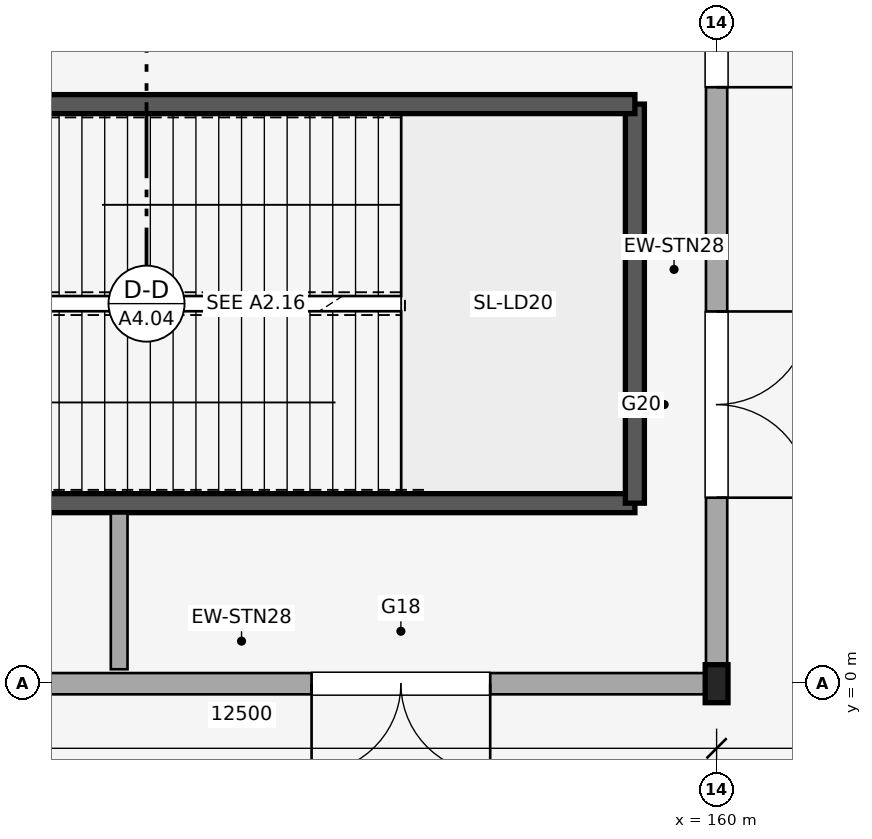
"""IFC4 building model, lengths in metres.
Left out: names, types, materials, properties, quantities, classifications, styles, units other than length and angle.
Written with IfcOpenShell. Run it as: python <this file> out.ifc"""

import sys

from ifc_helpers import new_model, si_unit, direction, frame, frame_2d, origin, origin_2d, place, context, subcontext, project, spatial, rectangle, i_section, extrude, element, fill, save


model = new_model("IFC4")
c1 = context("Model", 3, precision=1e-05, world=origin(), true_north=direction((0.0, 1.0)))
c2 = subcontext(c1, "Body", "Model", "MODEL_VIEW")
j1 = project(units=[si_unit("LENGTHUNIT", "METRE"), si_unit("PLANEANGLEUNIT", "RADIAN")], contexts=[c1])
p1 = place(None, origin())
s1 = spatial("IfcSite", under=j1, at=p1, CompositionType="ELEMENT")
p2 = place(p1, origin())
s2 = spatial("IfcBuilding", under=s1, at=p2, CompositionType="ELEMENT")
p3 = place(p2, origin())
s3 = spatial("IfcBuildingStorey", under=s2, at=p3, CompositionType="ELEMENT", Elevation=0.0)
p4 = place(p3, frame((160.0, 0.0, 0.0), z_axis=(0.0, 0.0, 1.0), x_axis=(1.0, 0.0, 0.0)))
e1 = element("IfcColumn", 1, at=p4, inside=s3, PredefinedType="COLUMN", context=c2, shape_type="SweptSolid", body=[
    extrude(i_section(OverallWidth=0.3, OverallDepth=0.5, WebThickness=0.014, FlangeThickness=0.028, FilletRadius=0.027, at=origin_2d()), origin(), (0.0, 0.0, 1.0), 5.4),
])
p5 = place(p3, frame((147.647, 0.0, 0.0), z_axis=(0.0, 0.0, 1.0), x_axis=(1.0, 0.0, 0.0)))
e2 = element("IfcWall", 2, at=p5, inside=s3, PredefinedType="STANDARD", context=c2, shape_type="SweptSolid", body=[
    extrude(rectangle(XDim=12.206, YDim=0.28, at=frame_2d((6.103, 0.0))), origin(), (0.0, 0.0, 1.0), 4.48),
])
p6 = place(p5, frame((2.003, 0.0, 0.0)))
e3 = element("IfcOpeningElement", 3, at=p6, cuts=e2, PredefinedType="OPENING", context=c2, shape_type="SweptSolid", body=[
    extrude(rectangle(XDim=1.3, YDim=2.2, at=frame_2d((0.65, 1.1))), frame((0.0, 0.15, 0.0), z_axis=(0.0, -1.0, 0.0), x_axis=(1.0, 0.0, 0.0)), (0.0, 0.0, 1.0), 0.3),
])
p7 = place(p5, frame((7.024, 0.0, 0.0)))
e4 = element("IfcOpeningElement", 4, at=p7, cuts=e2, PredefinedType="OPENING", context=c2, shape_type="SweptSolid", body=[
    extrude(rectangle(XDim=2.35, YDim=2.4, at=frame_2d((1.175, 1.2))), frame((0.0, 0.15, 0.0), z_axis=(0.0, -1.0, 0.0), x_axis=(1.0, 0.0, 0.0)), (0.0, 0.0, 1.0), 0.3),
])
p8 = place(p3, frame((160.0, 0.247, 0.0), z_axis=(0.0, 0.0, 1.0), x_axis=(0.0, 1.0, 0.0)))
e5 = element("IfcWall", 5, at=p8, inside=s3, PredefinedType="STANDARD", context=c2, shape_type="SweptSolid", body=[
    extrude(rectangle(XDim=10.406, YDim=0.28, at=frame_2d((5.203, 0.0))), origin(), (0.0, 0.0, 1.0), 4.48),
])
p9 = place(p8, frame((7.6, 0.0, 0.0)))
e6 = element("IfcOpeningElement", 6, at=p9, cuts=e5, PredefinedType="OPENING", context=c2, shape_type="SweptSolid", body=[
    extrude(rectangle(XDim=1.3, YDim=2.2, at=frame_2d((0.65, 1.1))), frame((0.0, 0.15, 0.0), z_axis=(0.0, -1.0, 0.0), x_axis=(1.0, 0.0, 0.0)), (0.0, 0.0, 1.0), 0.3),
])
p10 = place(p8, frame((2.2, 0.0, 0.0)))
e7 = element("IfcOpeningElement", 7, at=p10, cuts=e5, PredefinedType="OPENING", context=c2, shape_type="SweptSolid", body=[
    extrude(rectangle(XDim=2.45, YDim=2.4, at=frame_2d((1.225, 1.2))), frame((0.0, 0.15, 0.0), z_axis=(0.0, -1.0, 0.0), x_axis=(1.0, 0.0, 0.0)), (0.0, 0.0, 1.0), 0.3),
])
p11 = place(p3, frame((148.475, 2.375, 0.0), z_axis=(0.0, 0.0, 1.0), x_axis=(1.0, 0.0, 0.0)))
e8 = element("IfcWall", 8, at=p11, inside=s3, PredefinedType="SHEAR", context=c2, shape_type="SweptSolid", body=[
    extrude(rectangle(XDim=10.45, YDim=0.25, at=frame_2d((5.225, 0.0))), origin(), (0.0, 0.0, 1.0), 5.1),
])
p12 = place(p11, frame((0.65, 0.0, 0.0)))
e9 = element("IfcOpeningElement", 9, at=p12, cuts=e8, PredefinedType="OPENING", context=c2, shape_type="SweptSolid", body=[
    extrude(rectangle(XDim=1.4, YDim=2.2, at=frame_2d((0.7, 1.1))), frame((0.0, 0.135, 0.0), z_axis=(0.0, -1.0, 0.0), x_axis=(1.0, 0.0, 0.0)), (0.0, 0.0, 1.0), 0.27),
])
p13 = place(p3, frame((158.925, 2.375, 0.0), z_axis=(0.0, 0.0, 1.0), x_axis=(0.0, 1.0, 0.0)))
e10 = element("IfcWall", 10, at=p13, inside=s3, PredefinedType="SHEAR", context=c2, shape_type="SweptSolid", body=[
    extrude(rectangle(XDim=5.25, YDim=0.25, at=frame_2d((2.625, 0.0))), origin(), (0.0, 0.0, 1.0), 5.1),
])
p14 = place(p3, frame((158.925, 7.625, 0.0), z_axis=(0.0, 0.0, 1.0), x_axis=(-1.0, 0.0, 0.0)))
e11 = element("IfcWall", 11, at=p14, inside=s3, PredefinedType="SHEAR", context=c2, shape_type="SweptSolid", body=[
    extrude(rectangle(XDim=10.45, YDim=0.25, at=frame_2d((5.225, 0.0))), origin(), (0.0, 0.0, 1.0), 5.1),
])
p15 = place(p3, frame((152.14, 0.19, 0.0), z_axis=(0.0, 0.0, 1.0), x_axis=(0.0, 1.0, 0.0)))
e12 = element("IfcWall", 12, at=p15, inside=s3, PredefinedType="PARTITIONING", context=c2, shape_type="SweptSolid", body=[
    extrude(rectangle(XDim=2.05, YDim=0.22, at=frame_2d((1.025, 0.0))), origin(), (0.0, 0.0, 1.0), 3.69),
])
p16 = place(p7, frame((2.35, 0.0, 0.0), z_axis=(0.0, 0.0, 1.0), x_axis=(-1.0, 0.0, 0.0)))
e13 = element("IfcDoor", 13, at=p16, inside=s3, OperationType="DOUBLE_DOOR_SINGLE_SWING", PredefinedType="DOOR", context=c2, shape_type="SweptSolid", body=[
    extrude(rectangle(XDim=2.35, YDim=2.4, at=frame_2d((1.175, 1.2))), frame((0.0, 0.025, 0.0), z_axis=(0.0, -1.0, 0.0), x_axis=(1.0, 0.0, 0.0)), (0.0, 0.0, 1.0), 0.05),
])
fill(e4, e13)
p17 = place(p9, frame((1.3, 0.0, 0.0), z_axis=(0.0, 0.0, 1.0), x_axis=(-1.0, 0.0, 0.0)))
e14 = element("IfcDoor", 14, at=p17, inside=s3, OperationType="SINGLE_SWING_RIGHT", PredefinedType="DOOR", context=c2, shape_type="SweptSolid", body=[
    extrude(rectangle(XDim=1.3, YDim=2.2, at=frame_2d((0.65, 1.1))), frame((0.0, 0.025, 0.0), z_axis=(0.0, -1.0, 0.0), x_axis=(1.0, 0.0, 0.0)), (0.0, 0.0, 1.0), 0.05),
])
fill(e6, e14)
p18 = place(p10, frame((2.45, 0.0, 0.0), z_axis=(0.0, 0.0, 1.0), x_axis=(-1.0, 0.0, 0.0)))
e15 = element("IfcDoor", 15, at=p18, inside=s3, OperationType="DOUBLE_DOOR_SINGLE_SWING", PredefinedType="DOOR", context=c2, shape_type="SweptSolid", body=[
    extrude(rectangle(XDim=2.45, YDim=2.4, at=frame_2d((1.225, 1.2))), frame((0.0, 0.025, 0.0), z_axis=(0.0, -1.0, 0.0), x_axis=(1.0, 0.0, 0.0)), (0.0, 0.0, 1.0), 0.05),
])
fill(e7, e15)
save(model, sys.argv[1])
